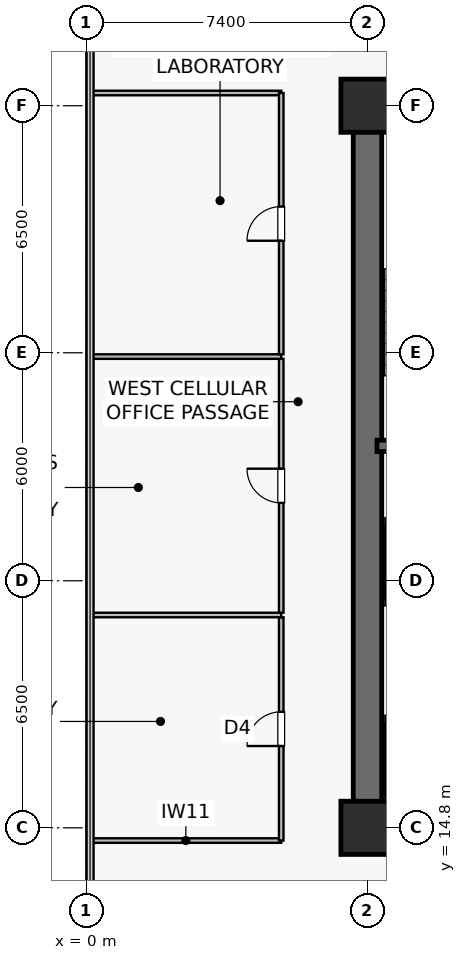
"""IFC4 building model, lengths in metres.
Left out: names, types, materials, properties, quantities, classifications, styles, units other than length and angle.
Written with IfcOpenShell. Run it as: python <this file> out.ifc"""

import sys

from ifc_helpers import new_model, si_unit, direction, frame, frame_2d, origin, origin_2d, place, context, subcontext, project, spatial, rectangle, extrude, source, transform, mapped, element, fill, save


model = new_model("IFC4")
c1 = context("Model", 3, precision=1e-05, world=origin(), true_north=direction((0.0, 1.0)))
c2 = subcontext(c1, "Body", "Model", "MODEL_VIEW")
j1 = project(units=[si_unit("LENGTHUNIT", "METRE"), si_unit("PLANEANGLEUNIT", "RADIAN")], contexts=[c1])
p1 = place(None, origin())
s1 = spatial("IfcSite", under=j1, at=p1, CompositionType="ELEMENT")
p2 = place(p1, origin())
s2 = spatial("IfcBuilding", under=s1, at=p2, CompositionType="ELEMENT")
p3 = place(p2, frame((0.0, 0.0, 74.4)))
s3 = spatial("IfcBuildingStorey", under=s2, at=p3, CompositionType="ELEMENT", Elevation=74.4)
p4 = place(p3, frame((7.025, 14.8, 0.0), z_axis=(0.0, 0.0, 1.0), x_axis=(1.0, 0.0, 0.0)))
e1 = element("IfcWall", 1, at=p4, inside=s3, PredefinedType="SHEAR", context=c2, shape_type="SweptSolid", body=[
    extrude(rectangle(XDim=15.55, YDim=0.75, at=frame_2d((7.775, 0.0))), origin(), (0.0, 0.0, 1.0), 3.78),
])
p5 = place(p3, frame((7.025, 33.8, 0.0), z_axis=(0.0, 0.0, 1.0), x_axis=(1.0, 0.0, 0.0)))
e2 = element("IfcWall", 2, at=p5, inside=s3, PredefinedType="SHEAR", context=c2, shape_type="SweptSolid", body=[
    extrude(rectangle(XDim=15.55, YDim=0.75, at=frame_2d((7.775, 0.0))), origin(), (0.0, 0.0, 1.0), 3.78),
])
p6 = place(p5, frame((6.875, 0.0, 0.0)))
e3 = element("IfcOpeningElement", 3, at=p6, cuts=e2, PredefinedType="OPENING", context=c2, shape_type="SweptSolid", body=[
    extrude(rectangle(XDim=0.95, YDim=2.15, at=frame_2d((0.475, 1.075))), frame((0.0, 0.385, 0.0), z_axis=(0.0, -1.0, 0.0), x_axis=(1.0, 0.0, 0.0)), (0.0, 0.0, 1.0), 0.77),
])
p7 = place(p5, frame((11.94, 0.0, 0.0)))
e4 = element("IfcOpeningElement", 4, at=p7, cuts=e2, PredefinedType="OPENING", context=c2, shape_type="SweptSolid", body=[
    extrude(rectangle(XDim=0.95, YDim=2.15, at=frame_2d((0.475, 1.075))), frame((0.0, 0.385, 0.0), z_axis=(0.0, -1.0, 0.0), x_axis=(1.0, 0.0, 0.0)), (0.0, 0.0, 1.0), 0.77),
])
p8 = place(p3, frame((7.4, 15.175, 0.0), z_axis=(0.0, 0.0, 1.0), x_axis=(0.0, 1.0, 0.0)))
e5 = element("IfcWall", 5, at=p8, inside=s3, PredefinedType="SHEAR", context=c2, shape_type="SweptSolid", body=[
    extrude(rectangle(XDim=18.25, YDim=0.75, at=frame_2d((9.125, 0.0))), origin(), (0.0, 0.0, 1.0), 3.78),
])
p9 = place(p3, frame((7.65, 24.85, 0.0), z_axis=(0.0, 0.0, 1.0), x_axis=(1.0, 0.0, 0.0)))
e6 = element("IfcWall", 6, at=p9, inside=s3, PredefinedType="SHEAR", context=c2, shape_type="SweptSolid", body=[
    extrude(rectangle(XDim=3.8, YDim=0.3, at=frame_2d((1.9, 0.0))), origin(), (0.0, 0.0, 1.0), 3.78),
])
p10 = place(p3, frame((7.73, 33.4, 0.0), z_axis=(0.0, 0.0, 1.0), x_axis=(1.0, 0.0, 0.0)))
e7 = element("IfcWall", 7, at=p10, inside=s3, PredefinedType="SOLIDWALL", context=c2, shape_type="SweptSolid", body=[
    extrude(rectangle(XDim=3.72, YDim=0.12, at=frame_2d((1.86, 0.0))), origin(), (0.0, 0.0, 1.0), 3.78),
])
m1 = source(origin(), c2, "Body", "SweptSolid", [
    extrude(rectangle(XDim=1.4, YDim=1.4, at=origin_2d()), origin(), (0.0, 0.0, 1.0), 4.1),
])
for number, where, z_axis, x_axis in (
    (8, (7.4, 14.8, 0.0), (0.0, 0.0, 1.0), (1.0, 0.0, 0.0)),
    (9, (7.4, 33.8, 0.0), (0.0, 0.0, 1.0), (1.0, 0.0, 0.0)),
):
    element("IfcColumn", number, at=place(p3, frame(where, z_axis=z_axis, x_axis=x_axis)), inside=s3, PredefinedType="COLUMN", context=c2, shape_type="MappedRepresentation", body=[
        mapped(m1, transform((0.0, 0.0, 0.0), scale=1.0)),
    ])
p11 = place(p3, frame((7.87, 17.65, 0.0), z_axis=(0.0, 0.0, 1.0), x_axis=(1.0, 0.0, 0.0)))
e10 = element("IfcWall", 10, at=p11, inside=s3, PredefinedType="SOLIDWALL", context=c2, shape_type="SweptSolid", body=[
    extrude(rectangle(XDim=2.26, YDim=0.2, at=frame_2d((1.13, 0.0))), origin(), (0.0, 0.0, 1.0), 3.78),
])
p12 = place(p11, frame((0.58, 0.0, 0.0)))
e11 = element("IfcOpeningElement", 11, at=p12, cuts=e10, PredefinedType="OPENING", context=c2, shape_type="SweptSolid", body=[
    extrude(rectangle(XDim=1.1, YDim=2.22, at=frame_2d((0.55, 1.11))), frame((0.0, 0.11, 0.0), z_axis=(0.0, -1.0, 0.0), x_axis=(1.0, 0.0, 0.0)), (0.0, 0.0, 1.0), 0.22),
])
p13 = place(p3, frame((7.87, 15.55, 0.0), z_axis=(0.0, 0.0, 1.0), x_axis=(1.0, 0.0, 0.0)))
e12 = element("IfcWall", 12, at=p13, inside=s3, PredefinedType="SOLIDWALL", context=c2, shape_type="SweptSolid", body=[
    extrude(rectangle(XDim=2.26, YDim=0.2, at=frame_2d((1.13, 0.0))), origin(), (0.0, 0.0, 1.0), 3.78),
])
p14 = place(p3, frame((7.95, 15.65, 0.0), z_axis=(0.0, 0.0, 1.0), x_axis=(0.0, 1.0, 0.0)))
e13 = element("IfcWall", 13, at=p14, inside=s3, PredefinedType="SOLIDWALL", context=c2, shape_type="SweptSolid", body=[
    extrude(rectangle(XDim=1.9, YDim=0.18, at=frame_2d((0.95, 0.0))), origin(), (0.0, 0.0, 1.0), 3.78),
])
for number, where, z_axis, x_axis in (
    (14, (7.87, 20.75, 0.0), (0.0, 0.0, 1.0), (1.0, 0.0, 0.0)),
    (15, (7.87, 22.85, 0.0), (0.0, 0.0, 1.0), (1.0, 0.0, 0.0)),
):
    element("IfcWall", number, at=place(p3, frame(where, z_axis=z_axis, x_axis=x_axis)), inside=s3, PredefinedType="SOLIDWALL", context=c2, shape_type="SweptSolid", body=[
        extrude(rectangle(XDim=2.26, YDim=0.2, at=frame_2d((1.13, 0.0))), origin(), (0.0, 0.0, 1.0), 3.78),
    ])
p15 = place(p3, frame((7.95, 20.85, 0.0), z_axis=(0.0, 0.0, 1.0), x_axis=(0.0, 1.0, 0.0)))
e16 = element("IfcWall", 16, at=p15, inside=s3, PredefinedType="SOLIDWALL", context=c2, shape_type="SweptSolid", body=[
    extrude(rectangle(XDim=1.9, YDim=0.18, at=frame_2d((0.95, 0.0))), origin(), (0.0, 0.0, 1.0), 3.78),
])
for number, where, z_axis, x_axis in (
    (17, (0.11, 14.465, 0.0), (0.0, 0.0, 1.0), (1.0, 0.0, 0.0)),
    (18, (0.11, 34.135, 0.0), (0.0, 0.0, 1.0), (1.0, 0.0, 0.0)),
):
    element("IfcWall", number, at=place(p3, frame(where, z_axis=z_axis, x_axis=x_axis)), inside=s3, PredefinedType="PARTITIONING", context=c2, shape_type="SweptSolid", body=[
        extrude(rectangle(XDim=5.02, YDim=0.12, at=frame_2d((2.51, 0.0))), origin(), (0.0, 0.0, 1.0), 3.78),
    ])
p16 = place(p3, frame((5.13, 14.465, 0.0), z_axis=(0.0, 0.0, 1.0), x_axis=(0.0, 1.0, 0.0)))
e19 = element("IfcWall", 19, at=p16, inside=s3, PredefinedType="PARTITIONING", context=c2, shape_type="SweptSolid", body=[
    extrude(rectangle(XDim=5.875, YDim=0.12, at=frame_2d((2.938, 0.0))), origin(), (0.0, 0.0, 1.0), 3.78),
])
p17 = place(p16, frame((2.488, 0.0, 0.0)))
e20 = element("IfcOpeningElement", 20, at=p17, cuts=e19, PredefinedType="OPENING", context=c2, shape_type="SweptSolid", body=[
    extrude(rectangle(XDim=0.9, YDim=2.1, at=frame_2d((0.45, 1.05))), frame((0.0, 0.07, 0.0), z_axis=(0.0, -1.0, 0.0), x_axis=(1.0, 0.0, 0.0)), (0.0, 0.0, 1.0), 0.14),
])
p18 = place(p3, frame((0.11, 20.4, 0.0), z_axis=(0.0, 0.0, 1.0), x_axis=(1.0, 0.0, 0.0)))
e21 = element("IfcWall", 21, at=p18, inside=s3, PredefinedType="PARTITIONING", context=c2, shape_type="SweptSolid", body=[
    extrude(rectangle(XDim=5.02, YDim=0.12, at=frame_2d((2.51, 0.0))), origin(), (0.0, 0.0, 1.0), 3.78),
])
p19 = place(p3, frame((5.13, 20.46, 0.0), z_axis=(0.0, 0.0, 1.0), x_axis=(0.0, 1.0, 0.0)))
e22 = element("IfcWall", 22, at=p19, inside=s3, PredefinedType="PARTITIONING", context=c2, shape_type="SweptSolid", body=[
    extrude(rectangle(XDim=6.68, YDim=0.12, at=frame_2d((3.34, 0.0))), origin(), (0.0, 0.0, 1.0), 3.78),
])
p20 = place(p19, frame((2.89, 0.0, 0.0)))
e23 = element("IfcOpeningElement", 23, at=p20, cuts=e22, PredefinedType="OPENING", context=c2, shape_type="SweptSolid", body=[
    extrude(rectangle(XDim=0.9, YDim=2.1, at=frame_2d((0.45, 1.05))), frame((0.0, 0.07, 0.0), z_axis=(0.0, -1.0, 0.0), x_axis=(1.0, 0.0, 0.0)), (0.0, 0.0, 1.0), 0.14),
])
p21 = place(p3, frame((0.11, 27.2, 0.0), z_axis=(0.0, 0.0, 1.0), x_axis=(1.0, 0.0, 0.0)))
e24 = element("IfcWall", 24, at=p21, inside=s3, PredefinedType="PARTITIONING", context=c2, shape_type="SweptSolid", body=[
    extrude(rectangle(XDim=5.02, YDim=0.12, at=frame_2d((2.51, 0.0))), origin(), (0.0, 0.0, 1.0), 3.78),
])
p22 = place(p3, frame((5.13, 27.26, 0.0), z_axis=(0.0, 0.0, 1.0), x_axis=(0.0, 1.0, 0.0)))
e25 = element("IfcWall", 25, at=p22, inside=s3, PredefinedType="PARTITIONING", context=c2, shape_type="SweptSolid", body=[
    extrude(rectangle(XDim=6.875, YDim=0.12, at=frame_2d((3.438, 0.0))), origin(), (0.0, 0.0, 1.0), 3.78),
])
p23 = place(p22, frame((2.988, 0.0, 0.0)))
e26 = element("IfcOpeningElement", 26, at=p23, cuts=e25, PredefinedType="OPENING", context=c2, shape_type="SweptSolid", body=[
    extrude(rectangle(XDim=0.9, YDim=2.1, at=frame_2d((0.45, 1.05))), frame((0.0, 0.07, 0.0), z_axis=(0.0, -1.0, 0.0), x_axis=(1.0, 0.0, 0.0)), (0.0, 0.0, 1.0), 0.14),
])
m2 = source(origin(), c2, "Body", "SweptSolid", [
    extrude(rectangle(XDim=0.9, YDim=2.1, at=frame_2d((0.45, 1.05))), frame((0.0, 0.025, 0.0), z_axis=(0.0, -1.0, 0.0), x_axis=(1.0, 0.0, 0.0)), (0.0, 0.0, 1.0), 0.05),
])
p24 = place(p17, origin())
e27 = element("IfcDoor", 27, at=p24, inside=s3, OperationType="SINGLE_SWING_LEFT", PredefinedType="DOOR", context=c2, shape_type="MappedRepresentation", body=[
    mapped(m2, transform((0.0, 0.0, 0.0), scale=1.0)),
])
fill(e20, e27)
p25 = place(p20, origin())
e28 = element("IfcDoor", 28, at=p25, inside=s3, OperationType="SINGLE_SWING_RIGHT", PredefinedType="DOOR", context=c2, shape_type="MappedRepresentation", body=[
    mapped(m2, transform((0.0, 0.0, 0.0), scale=1.0)),
])
fill(e23, e28)
p26 = place(p23, origin())
e29 = element("IfcDoor", 29, at=p26, inside=s3, OperationType="SINGLE_SWING_LEFT", PredefinedType="DOOR", context=c2, shape_type="MappedRepresentation", body=[
    mapped(m2, transform((0.0, 0.0, 0.0), scale=1.0)),
])
fill(e26, e29)
save(model, sys.argv[1])
